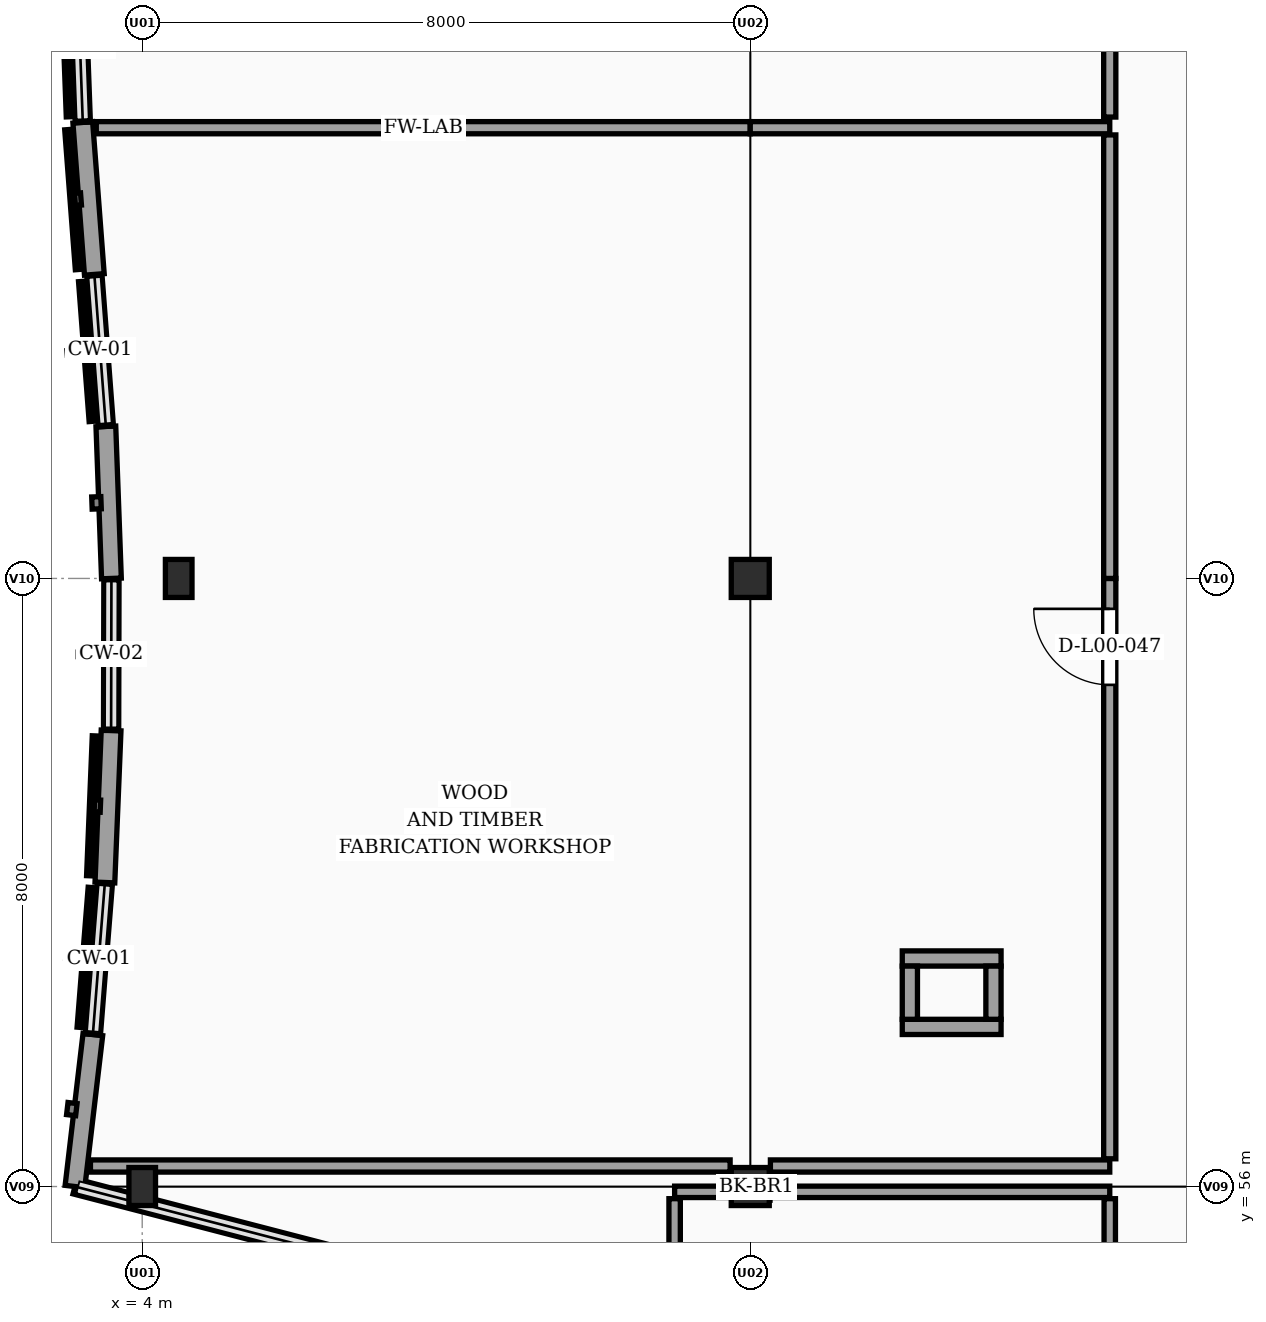
"""IFC4 building model, lengths in metres.
Left out: names, types, materials, properties, quantities, classifications, styles, units other than length and angle.
Written with IfcOpenShell. Run it as: python <this file> out.ifc"""

import sys

from ifc_helpers import new_model, si_unit, direction, frame, frame_2d, origin, origin_2d, place, context, subcontext, project, spatial, rectangle, extrude, element, fill, save


model = new_model("IFC4")
c1 = context("Model", 3, precision=1e-05, world=origin(), true_north=direction((0.0, 1.0)))
c2 = subcontext(c1, "Body", "Model", "MODEL_VIEW")
j1 = project(units=[si_unit("LENGTHUNIT", "METRE"), si_unit("PLANEANGLEUNIT", "RADIAN")], contexts=[c1])
p1 = place(None, origin())
s1 = spatial("IfcSite", under=j1, at=p1, CompositionType="ELEMENT")
p2 = place(p1, origin())
s2 = spatial("IfcBuilding", under=s1, at=p2, CompositionType="ELEMENT")
p3 = place(p2, origin())
s3 = spatial("IfcBuildingStorey", under=s2, at=p3, CompositionType="ELEMENT", Elevation=0.0)
for number, where, z_axis, x_axis in (
    (1, (4.0, 56.0, -0.2), (0.0, 0.0, 1.0), (1.0, 0.0, 0.0)),
    (2, (4.48, 64.0, -0.2), (0.0, 0.0, 1.0), (1.0, 0.0, 0.0)),
):
    element("IfcColumn", number, at=place(p3, frame(where, z_axis=z_axis, x_axis=x_axis)), inside=s3, PredefinedType="PILASTER", context=c2, shape_type="SweptSolid", body=[
        extrude(rectangle(XDim=0.35, YDim=0.5, at=origin_2d()), origin(), (0.0, 0.0, 1.0), 4.7),
    ])
for number, where, z_axis, x_axis in (
    (3, (12.0, 56.0, -0.2), (0.0, 0.0, 1.0), (1.0, 0.0, 0.0)),
    (4, (12.0, 64.0, -0.2), (0.0, 0.0, 1.0), (1.0, 0.0, 0.0)),
):
    element("IfcColumn", number, at=place(p3, frame(where, z_axis=z_axis, x_axis=x_axis)), inside=s3, PredefinedType="COLUMN", context=c2, shape_type="SweptSolid", body=[
        extrude(rectangle(XDim=0.5, YDim=0.5, at=origin_2d()), origin(), (0.0, 0.0, 1.0), 4.7),
    ])
p4 = place(p3, frame((10.822, 54.0, 0.0), z_axis=(0.0, 0.0, 1.0), x_axis=(-0.967937555254, 0.251190941573, 0.0)))
e5 = element("IfcWall", 5, at=p4, inside=s3, PredefinedType="SOLIDWALL", context=c2, shape_type="SweptSolid", body=[
    extrude(rectangle(XDim=7.962, YDim=0.2, at=frame_2d((3.981, 0.0))), origin(), (0.0, 0.0, 1.0), 0.95),
])
p5 = place(p3, frame((3.115, 56.0, 0.0), z_axis=(0.0, 0.0, 1.0), x_axis=(0.116988959085, 0.99313321536, 0.0)))
e6 = element("IfcWall", 6, at=p5, inside=s3, PredefinedType="SOLIDWALL", context=c2, shape_type="SweptSolid", body=[
    extrude(rectangle(XDim=2.014, YDim=0.26, at=frame_2d((1.007, 0.0))), origin(), (0.0, 0.0, 1.0), 4.24),
])
p6 = place(p3, frame((3.351, 58.0, 0.0), z_axis=(0.0, 0.0, 1.0), x_axis=(0.078976178075, 0.996876503533, 0.0)))
e7 = element("IfcWall", 7, at=p6, inside=s3, PredefinedType="SOLIDWALL", context=c2, shape_type="SweptSolid", body=[
    extrude(rectangle(XDim=2.006, YDim=0.2, at=frame_2d((1.003, 0.0))), origin(), (0.0, 0.0, 1.0), 0.95),
])
p7 = place(p3, frame((3.509, 60.0, 0.0), z_axis=(0.0, 0.0, 1.0), x_axis=(0.040737639062, 0.99916987783, 0.0)))
e8 = element("IfcWall", 8, at=p7, inside=s3, PredefinedType="SOLIDWALL", context=c2, shape_type="SweptSolid", body=[
    extrude(rectangle(XDim=2.002, YDim=0.26, at=frame_2d((1.001, 0.0))), origin(), (0.0, 0.0, 1.0), 4.24),
])
p8 = place(p3, frame((3.591, 62.0, 0.0), z_axis=(0.0, 0.0, 1.0), x_axis=(0.002197260321, 0.999997586021, 0.0)))
e9 = element("IfcWall", 9, at=p8, inside=s3, PredefinedType="SOLIDWALL", context=c2, shape_type="SweptSolid", body=[
    extrude(rectangle(XDim=2.0, YDim=0.2, at=frame_2d((1.0, 0.0))), origin(), (0.0, 0.0, 1.0), 0.95),
])
p9 = place(p3, frame((3.595, 64.0, 0.0), z_axis=(0.0, 0.0, 1.0), x_axis=(-0.036596562065, 0.999330121454, 0.0)))
e10 = element("IfcWall", 10, at=p9, inside=s3, PredefinedType="SOLIDWALL", context=c2, shape_type="SweptSolid", body=[
    extrude(rectangle(XDim=2.001, YDim=0.26, at=frame_2d((1.0, 0.0))), origin(), (0.0, 0.0, 1.0), 4.24),
])
p10 = place(p3, frame((3.522, 66.0, 0.0), z_axis=(0.0, 0.0, 1.0), x_axis=(-0.075588789742, 0.997139074987, 0.0)))
e11 = element("IfcWall", 11, at=p10, inside=s3, PredefinedType="SOLIDWALL", context=c2, shape_type="SweptSolid", body=[
    extrude(rectangle(XDim=2.006, YDim=0.2, at=frame_2d((1.003, 0.0))), origin(), (0.0, 0.0, 1.0), 0.95),
])
p11 = place(p3, frame((3.37, 68.0, 0.0), z_axis=(0.0, 0.0, 1.0), x_axis=(-0.075709813676, 0.9971298933, 0.0)))
e12 = element("IfcWall", 12, at=p11, inside=s3, PredefinedType="SOLIDWALL", context=c2, shape_type="SweptSolid", body=[
    extrude(rectangle(XDim=2.006, YDim=0.26, at=frame_2d((1.003, 0.0))), origin(), (0.0, 0.0, 1.0), 4.24),
])
p12 = place(p3, frame((3.218, 70.0, 0.0), z_axis=(0.0, 0.0, 1.0), x_axis=(-0.036596562065, 0.999330121454, 0.0)))
e13 = element("IfcWall", 13, at=p12, inside=s3, PredefinedType="SOLIDWALL", context=c2, shape_type="SweptSolid", body=[
    extrude(rectangle(XDim=2.001, YDim=0.2, at=frame_2d((1.0, 0.0))), origin(), (0.0, 0.0, 1.0), 0.95),
])
for number, where, z_axis, x_axis in (
    (14, (15.3, 58.1, 0.0), (0.0, 0.0, 1.0), (-1.0, 0.0, 0.0)),
    (15, (14.0, 59.0, 0.0), (0.0, 0.0, 1.0), (1.0, 0.0, 0.0)),
):
    element("IfcWall", number, at=place(p3, frame(where, z_axis=z_axis, x_axis=x_axis)), inside=s3, PredefinedType="PARTITIONING", context=c2, shape_type="SweptSolid", body=[
        extrude(rectangle(XDim=1.3, YDim=0.2, at=frame_2d((0.65, 0.0))), origin(), (0.0, 0.0, 1.0), 4.24),
    ])
for number, where, z_axis, x_axis in (
    (16, (14.1, 58.2, 0.0), (0.0, 0.0, 1.0), (0.0, 1.0, 0.0)),
    (17, (15.2, 58.9, 0.0), (0.0, 0.0, 1.0), (0.0, -1.0, 0.0)),
):
    element("IfcWall", number, at=place(p3, frame(where, z_axis=z_axis, x_axis=x_axis)), inside=s3, PredefinedType="PARTITIONING", context=c2, shape_type="SweptSolid", body=[
        extrude(rectangle(XDim=0.7, YDim=0.2, at=frame_2d((0.35, 0.0))), origin(), (0.0, 0.0, 1.0), 4.24),
    ])
p13 = place(p3, frame((3.319, 56.27, 0.0), z_axis=(0.0, 0.0, 1.0), x_axis=(1.0, 0.0, 0.0)))
e18 = element("IfcWall", 18, at=p13, inside=s3, PredefinedType="PARTITIONING", context=c2, shape_type="SweptSolid", body=[
    extrude(rectangle(XDim=8.416, YDim=0.16, at=frame_2d((4.208, 0.0))), origin(), (0.0, 0.0, 1.0), 3.59),
])
p14 = place(p3, frame((12.265, 56.27, 0.0), z_axis=(0.0, 0.0, 1.0), x_axis=(1.0, 0.0, 0.0)))
e19 = element("IfcWall", 19, at=p14, inside=s3, PredefinedType="PARTITIONING", context=c2, shape_type="SweptSolid", body=[
    extrude(rectangle(XDim=4.465, YDim=0.16, at=frame_2d((2.232, 0.0))), origin(), (0.0, 0.0, 1.0), 3.59),
])
p15 = place(p3, frame((3.396, 69.93, 0.0), z_axis=(0.0, 0.0, 1.0), x_axis=(1.0, 0.0, 0.0)))
e20 = element("IfcWall", 20, at=p15, inside=s3, PredefinedType="PARTITIONING", context=c2, shape_type="SweptSolid", body=[
    extrude(rectangle(XDim=8.604, YDim=0.16, at=frame_2d((4.302, 0.0))), origin(), (0.0, 0.0, 1.0), 4.24),
])
p16 = place(p3, frame((12.0, 69.93, 0.0), z_axis=(0.0, 0.0, 1.0), x_axis=(1.0, 0.0, 0.0)))
e21 = element("IfcWall", 21, at=p16, inside=s3, PredefinedType="PARTITIONING", context=c2, shape_type="SweptSolid", body=[
    extrude(rectangle(XDim=4.73, YDim=0.16, at=frame_2d((2.365, 0.0))), origin(), (0.0, 0.0, 1.0), 4.24),
])
p17 = place(p3, frame((16.73, 56.365, 0.0), z_axis=(0.0, 0.0, 1.0), x_axis=(0.0, 1.0, 0.0)))
e22 = element("IfcWall", 22, at=p17, inside=s3, PredefinedType="PARTITIONING", context=c2, shape_type="SweptSolid", body=[
    extrude(rectangle(XDim=7.635, YDim=0.16, at=frame_2d((3.817, 0.0))), origin(), (0.0, 0.0, 1.0), 4.24),
])
p18 = place(p17, frame((6.235, 0.0, 0.0)))
e23 = element("IfcOpeningElement", 23, at=p18, cuts=e22, PredefinedType="OPENING", context=c2, shape_type="SweptSolid", body=[
    extrude(rectangle(XDim=1.0, YDim=2.15, at=frame_2d((0.5, 1.075))), frame((0.0, 0.09, 0.0), z_axis=(0.0, -1.0, 0.0), x_axis=(1.0, 0.0, 0.0)), (0.0, 0.0, 1.0), 0.18),
])
p19 = place(p3, frame((16.73, 64.0, 0.0), z_axis=(0.0, 0.0, 1.0), x_axis=(0.0, 1.0, 0.0)))
e24 = element("IfcWall", 24, at=p19, inside=s3, PredefinedType="PARTITIONING", context=c2, shape_type="SweptSolid", body=[
    extrude(rectangle(XDim=5.835, YDim=0.16, at=frame_2d((2.917, 0.0))), origin(), (0.0, 0.0, 1.0), 4.24),
])
p20 = place(p3, frame((16.73, 70.07, 0.0), z_axis=(0.0, 0.0, 1.0), x_axis=(0.0, 1.0, 0.0)))
e25 = element("IfcWall", 25, at=p20, inside=s3, PredefinedType="PARTITIONING", context=c2, shape_type="SweptSolid", body=[
    extrude(rectangle(XDim=1.93, YDim=0.16, at=frame_2d((0.965, 0.0))), origin(), (0.0, 0.0, 1.0), 4.24),
])
p21 = place(p3, frame((11.005, 55.93, 0.0), z_axis=(0.0, 0.0, 1.0), x_axis=(1.0, 0.0, 0.0)))
e26 = element("IfcWall", 26, at=p21, inside=s3, PredefinedType="PARTITIONING", context=c2, shape_type="SweptSolid", body=[
    extrude(rectangle(XDim=5.725, YDim=0.15, at=frame_2d((2.863, 0.0))), origin(), (0.0, 0.0, 1.0), 3.59),
])
p22 = place(p3, frame((11.005, 54.02, 0.0), z_axis=(0.0, 0.0, 1.0), x_axis=(0.0, 1.0, 0.0)))
e27 = element("IfcWall", 27, at=p22, inside=s3, PredefinedType="PARTITIONING", context=c2, shape_type="SweptSolid", body=[
    extrude(rectangle(XDim=1.82, YDim=0.15, at=frame_2d((0.91, 0.0))), origin(), (0.0, 0.0, 1.0), 4.24),
])
p23 = place(p3, frame((16.73, 50.0, 0.0), z_axis=(0.0, 0.0, 1.0), x_axis=(0.0, 1.0, 0.0)))
e28 = element("IfcWall", 28, at=p23, inside=s3, PredefinedType="PARTITIONING", context=c2, shape_type="SweptSolid", body=[
    extrude(rectangle(XDim=5.84, YDim=0.15, at=frame_2d((2.92, 0.0))), origin(), (0.0, 0.0, 1.0), 4.24),
])
p24 = place(p23, frame((2.46, 0.0, 0.0)))
e29 = element("IfcOpeningElement", 29, at=p24, cuts=e28, PredefinedType="OPENING", context=c2, shape_type="SweptSolid", body=[
    extrude(rectangle(XDim=1.08, YDim=2.15, at=frame_2d((0.54, 1.075))), frame((0.0, 0.085, 0.0), z_axis=(0.0, -1.0, 0.0), x_axis=(1.0, 0.0, 0.0)), (0.0, 0.0, 1.0), 0.17),
])
p25 = place(p18, origin())
e30 = element("IfcDoor", 30, at=p25, inside=s3, OperationType="SINGLE_SWING_RIGHT", PredefinedType="DOOR", context=c2, shape_type="SweptSolid", body=[
    extrude(rectangle(XDim=1.0, YDim=2.15, at=frame_2d((0.5, 1.075))), frame((0.0, 0.025, 0.0), z_axis=(0.0, -1.0, 0.0), x_axis=(1.0, 0.0, 0.0)), (0.0, 0.0, 1.0), 0.05),
])
fill(e23, e30)
save(model, sys.argv[1])
